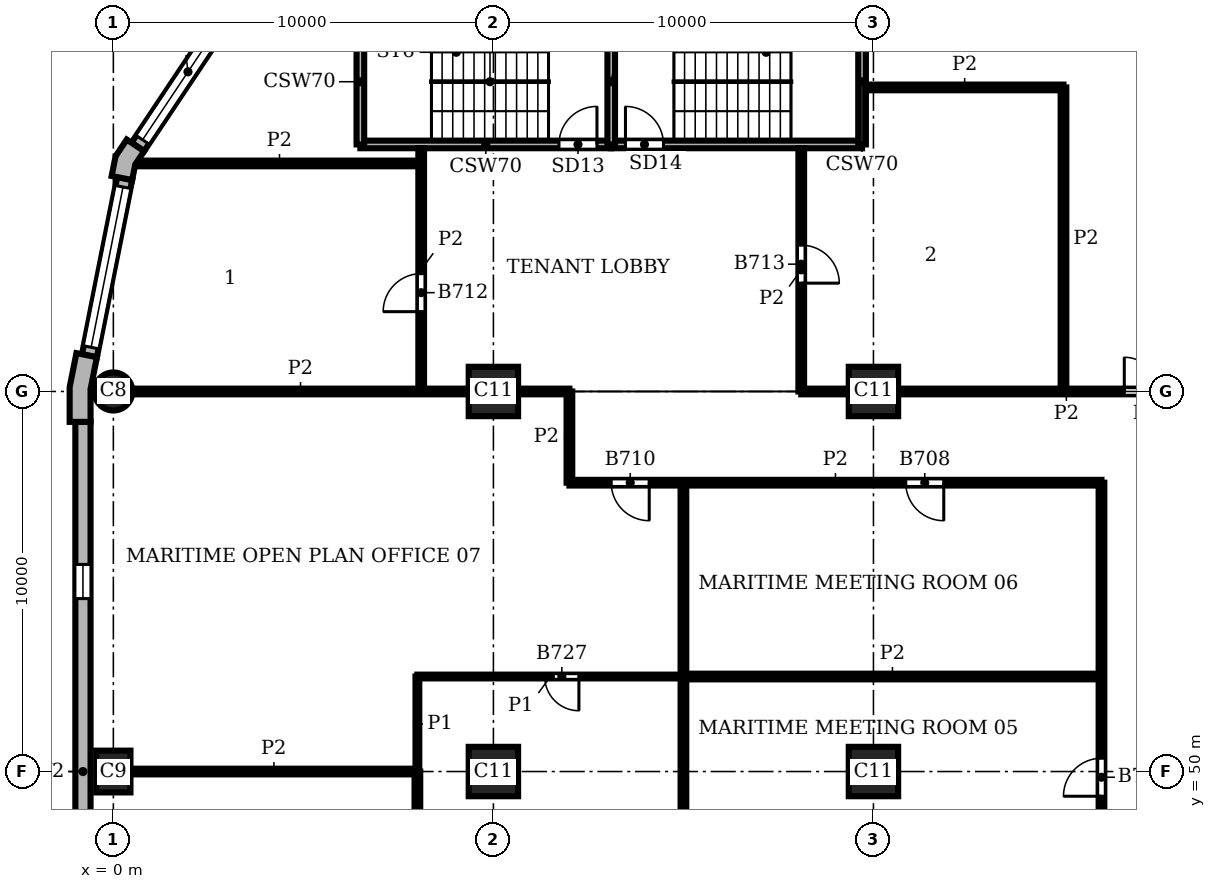
"""IFC4 building model, lengths in metres.
Left out: names, types, materials, properties, quantities, classifications, styles, units other than length and angle.
Written with IfcOpenShell. Run it as: python <this file> out.ifc"""

import sys

from ifc_helpers import new_model, si_unit, direction, frame, frame_2d, origin, origin_2d, place, context, subcontext, project, spatial, polyline, rectangle, circle, outline, extrude, element, fill, save


model = new_model("IFC4")
c1 = context("Model", 3, precision=1e-05, world=origin(), true_north=direction((0.0, 1.0)))
c2 = subcontext(c1, "Body", "Model", "MODEL_VIEW")
j1 = project(units=[si_unit("LENGTHUNIT", "METRE"), si_unit("PLANEANGLEUNIT", "RADIAN")], contexts=[c1])
p1 = place(None, origin())
s1 = spatial("IfcSite", under=j1, at=p1, CompositionType="ELEMENT")
p2 = place(p1, origin())
s2 = spatial("IfcBuilding", under=s1, at=p2, CompositionType="ELEMENT")
p3 = place(p2, frame((0.0, 0.0, 205.8)))
s3 = spatial("IfcBuildingStorey", under=s2, at=p3, CompositionType="ELEMENT", Elevation=205.8)
p4 = place(p3, frame((0.0, 60.0, 0.0), z_axis=(0.0, 0.0, 1.0), x_axis=(1.0, 0.0, 0.0)))
e1 = element("IfcColumn", 1, at=p4, inside=s3, PredefinedType="COLUMN", context=c2, shape_type="SweptSolid", body=[
    extrude(circle(Radius=0.5, at=origin_2d()), origin(), (0.0, 0.0, 1.0), 3.9),
])
p5 = place(p3, frame((0.0, 50.0, 0.0), z_axis=(0.0, 0.0, 1.0), x_axis=(0.0, 1.0, 0.0)))
e2 = element("IfcColumn", 2, at=p5, inside=s3, PredefinedType="COLUMN", context=c2, shape_type="SweptSolid", body=[
    extrude(rectangle(XDim=1.1, YDim=0.9, at=origin_2d()), origin(), (0.0, 0.0, 1.0), 3.9),
])
for number, where, z_axis, x_axis in (
    (3, (10.0, 50.0, 0.0), (0.0, 0.0, 1.0), (1.0, 0.0, 0.0)),
    (4, (10.0, 60.0, 0.0), (0.0, 0.0, 1.0), (1.0, 0.0, 0.0)),
    (5, (20.0, 50.0, 0.0), (0.0, 0.0, 1.0), (1.0, 0.0, 0.0)),
    (6, (20.0, 60.0, 0.0), (0.0, 0.0, 1.0), (1.0, 0.0, 0.0)),
):
    element("IfcColumn", number, at=place(p3, frame(where, z_axis=z_axis, x_axis=x_axis)), inside=s3, PredefinedType="COLUMN", context=c2, shape_type="SweptSolid", body=[
        extrude(rectangle(XDim=1.3, YDim=1.3, at=origin_2d()), origin(), (0.0, 0.0, 1.0), 3.9),
    ])
p6 = place(p3, origin())
e7 = element("IfcWall", 7, at=p6, inside=s3, PredefinedType="SOLIDWALL", context=c2, shape_type="SweptSolid", body=[
    extrude(outline(polyline([(0.477, 66.545), (0.352, 66.629), (0.059, 66.189), (-0.045, 65.67), (0.103, 65.641), (0.495, 65.563), (0.577, 65.974), (0.81, 66.323), (0.477, 66.545)])), origin(), (0.0, 0.0, 1.0), 3.9),
])
e8 = element("IfcWall", 8, at=p6, inside=s3, PredefinedType="SOLIDWALL", context=c2, shape_type="SweptSolid", body=[
    extrude(outline(polyline([(-0.825, 60.98), (-0.972, 61.009), (-1.15, 60.113), (-1.15, 59.2), (-1.0, 59.2), (-0.6, 59.2), (-0.6, 60.059), (-0.432, 60.902), (-0.825, 60.98)])), origin(), (0.0, 0.0, 1.0), 3.9),
])
p7 = place(p3, frame((29.357, 66.434, 0.0), z_axis=(0.0, 0.0, 1.0), x_axis=(-0.555541552266, 0.831488775454, 0.0)))
e9 = element("IfcWall", 9, at=p7, inside=s3, PredefinedType="SOLIDWALL", context=c2, shape_type="SweptSolid", body=[
    extrude(rectangle(XDim=4.753, YDim=0.4, at=frame_2d((2.376, 0.0))), origin(), (0.0, 0.0, 1.0), 3.9),
])
p8 = place(p7, frame((0.226, 0.0, 0.9)))
e10 = element("IfcOpeningElement", 10, at=p8, cuts=e9, PredefinedType="OPENING", context=c2, shape_type="SweptSolid", body=[
    extrude(rectangle(XDim=4.3, YDim=2.35, at=frame_2d((2.15, 1.175))), frame((0.0, 0.21, 0.0), z_axis=(0.0, -1.0, 0.0), x_axis=(1.0, 0.0, 0.0)), (0.0, 0.0, 1.0), 0.42),
])
p9 = place(p3, frame((3.284, 70.386, 0.0), z_axis=(0.0, 0.0, 1.0), x_axis=(-0.555541552266, -0.831488775454, 0.0)))
e11 = element("IfcWall", 11, at=p9, inside=s3, PredefinedType="SOLIDWALL", context=c2, shape_type="SweptSolid", body=[
    extrude(rectangle(XDim=4.753, YDim=0.4, at=frame_2d((2.376, 0.0))), origin(), (0.0, 0.0, 1.0), 3.9),
])
p10 = place(p9, frame((0.226, 0.0, 0.9)))
e12 = element("IfcOpeningElement", 12, at=p10, cuts=e11, PredefinedType="OPENING", context=c2, shape_type="SweptSolid", body=[
    extrude(rectangle(XDim=4.3, YDim=2.35, at=frame_2d((2.15, 1.175))), frame((0.0, 0.21, 0.0), z_axis=(0.0, -1.0, 0.0), x_axis=(1.0, 0.0, 0.0)), (0.0, 0.0, 1.0), 0.42),
])
p11 = place(p3, frame((0.299, 65.602, 0.0), z_axis=(0.0, 0.0, 1.0), x_axis=(-0.195098533057, -0.98078364709, 0.0)))
e13 = element("IfcWall", 13, at=p11, inside=s3, PredefinedType="SOLIDWALL", context=c2, shape_type="SweptSolid", body=[
    extrude(rectangle(XDim=4.753, YDim=0.4, at=frame_2d((2.376, 0.0))), origin(), (0.0, 0.0, 1.0), 3.9),
])
p12 = place(p11, frame((0.226, 0.0, 0.9)))
e14 = element("IfcOpeningElement", 14, at=p12, cuts=e13, PredefinedType="OPENING", context=c2, shape_type="SweptSolid", body=[
    extrude(rectangle(XDim=4.3, YDim=2.35, at=frame_2d((2.15, 1.175))), frame((0.0, 0.21, 0.0), z_axis=(0.0, -1.0, 0.0), x_axis=(1.0, 0.0, 0.0)), (0.0, 0.0, 1.0), 0.42),
])
p13 = place(p3, frame((-0.8, 59.2, 0.0), z_axis=(0.0, 0.0, 1.0), x_axis=(0.0, -1.0, 0.0)))
e15 = element("IfcWall", 15, at=p13, inside=s3, PredefinedType="SOLIDWALL", context=c2, shape_type="SweptSolid", body=[
    extrude(rectangle(XDim=18.4, YDim=0.4, at=frame_2d((9.2, 0.0))), origin(), (0.0, 0.0, 1.0), 3.9),
])
p14 = place(p13, frame((3.75, 0.0, 0.9)))
e16 = element("IfcOpeningElement", 16, at=p14, cuts=e15, PredefinedType="OPENING", context=c2, shape_type="SweptSolid", body=[
    extrude(rectangle(XDim=0.9, YDim=2.35, at=frame_2d((0.45, 1.175))), frame((0.0, 0.21, 0.0), z_axis=(0.0, -1.0, 0.0), x_axis=(1.0, 0.0, 0.0)), (0.0, 0.0, 1.0), 0.42),
])
p15 = place(p13, frame((13.75, 0.0, 0.9)))
e17 = element("IfcOpeningElement", 17, at=p15, cuts=e15, PredefinedType="OPENING", context=c2, shape_type="SweptSolid", body=[
    extrude(rectangle(XDim=0.9, YDim=2.35, at=frame_2d((0.45, 1.175))), frame((0.0, 0.21, 0.0), z_axis=(0.0, -1.0, 0.0), x_axis=(1.0, 0.0, 0.0)), (0.0, 0.0, 1.0), 0.42),
])
p16 = place(p3, frame((6.5, 66.5, 0.0), z_axis=(0.0, 0.0, 1.0), x_axis=(1.0, 0.0, 0.0)))
e18 = element("IfcWall", 18, at=p16, inside=s3, PredefinedType="SHEAR", context=c2, shape_type="SweptSolid", body=[
    extrude(rectangle(XDim=6.6, YDim=0.2, at=frame_2d((3.3, 0.0))), origin(), (0.0, 0.0, 1.0), 3.58),
])
p17 = place(p16, frame((5.225, 0.0, 0.0)))
e19 = element("IfcOpeningElement", 19, at=p17, cuts=e18, PredefinedType="OPENING", context=c2, shape_type="SweptSolid", body=[
    extrude(rectangle(XDim=1.0, YDim=2.1, at=frame_2d((0.5, 1.05))), frame((0.0, 0.11, 0.0), z_axis=(0.0, -1.0, 0.0), x_axis=(1.0, 0.0, 0.0)), (0.0, 0.0, 1.0), 0.22),
])
p18 = place(p3, frame((13.1, 66.5, 0.0), z_axis=(0.0, 0.0, 1.0), x_axis=(1.0, 0.0, 0.0)))
e20 = element("IfcWall", 20, at=p18, inside=s3, PredefinedType="SHEAR", context=c2, shape_type="SweptSolid", body=[
    extrude(rectangle(XDim=6.6, YDim=0.2, at=frame_2d((3.3, 0.0))), origin(), (0.0, 0.0, 1.0), 3.58),
])
p19 = place(p18, frame((0.375, 0.0, 0.0)))
e21 = element("IfcOpeningElement", 21, at=p19, cuts=e20, PredefinedType="OPENING", context=c2, shape_type="SweptSolid", body=[
    extrude(rectangle(XDim=1.0, YDim=2.1, at=frame_2d((0.5, 1.05))), frame((0.0, 0.11, 0.0), z_axis=(0.0, -1.0, 0.0), x_axis=(1.0, 0.0, 0.0)), (0.0, 0.0, 1.0), 0.22),
])
for number, where, z_axis, x_axis in (
    (22, (6.5, 66.5, 0.0), (0.0, 0.0, 1.0), (0.0, 1.0, 0.0)),
    (23, (13.1, 66.5, 0.0), (0.0, 0.0, 1.0), (0.0, 1.0, 0.0)),
    (24, (19.7, 66.5, 0.0), (0.0, 0.0, 1.0), (0.0, 1.0, 0.0)),
):
    element("IfcWall", number, at=place(p3, frame(where, z_axis=z_axis, x_axis=x_axis)), inside=s3, PredefinedType="SHEAR", context=c2, shape_type="SweptSolid", body=[
        extrude(rectangle(XDim=3.3, YDim=0.2, at=frame_2d((1.65, 0.0))), origin(), (0.0, 0.0, 1.0), 3.58),
    ])
p20 = place(p3, frame((8.0, 50.0, 0.0), z_axis=(0.0, 0.0, 1.0), x_axis=(0.0, 1.0, 0.0)))
e25 = element("IfcWall", 25, at=p20, inside=s3, PredefinedType="PARTITIONING", context=c2, shape_type="SweptSolid", body=[
    extrude(rectangle(XDim=2.5, YDim=0.1, at=frame_2d((1.25, 0.0))), origin(), (0.0, 0.0, 1.0), 3.58),
])
p21 = place(p3, frame((8.0, 52.5, 0.0), z_axis=(0.0, 0.0, 1.0), x_axis=(1.0, 0.0, 0.0)))
e26 = element("IfcWall", 26, at=p21, inside=s3, PredefinedType="PARTITIONING", context=c2, shape_type="SweptSolid", body=[
    extrude(rectangle(XDim=7.0, YDim=0.1, at=frame_2d((3.5, 0.0))), origin(), (0.0, 0.0, 1.0), 3.58),
])
p22 = place(p21, frame((3.35, 0.0, 0.0)))
e27 = element("IfcOpeningElement", 27, at=p22, cuts=e26, PredefinedType="OPENING", context=c2, shape_type="SweptSolid", body=[
    extrude(rectangle(XDim=0.9, YDim=2.1, at=frame_2d((0.45, 1.05))), frame((0.0, 0.06, 0.0), z_axis=(0.0, -1.0, 0.0), x_axis=(1.0, 0.0, 0.0)), (0.0, 0.0, 1.0), 0.12),
])
p23 = place(p3, frame((8.0, 40.0, 0.0), z_axis=(0.0, 0.0, 1.0), x_axis=(0.0, 1.0, 0.0)))
e28 = element("IfcWall", 28, at=p23, inside=s3, PredefinedType="PARTITIONING", context=c2, shape_type="SweptSolid", body=[
    extrude(rectangle(XDim=10.0, YDim=0.15, at=frame_2d((5.0, 0.0))), origin(), (0.0, 0.0, 1.0), 3.58),
])
p24 = place(p3, frame((8.1, 60.0, 0.0), z_axis=(0.0, 0.0, 1.0), x_axis=(0.0, 1.0, 0.0)))
e29 = element("IfcWall", 29, at=p24, inside=s3, PredefinedType="PARTITIONING", context=c2, shape_type="SweptSolid", body=[
    extrude(rectangle(XDim=6.4, YDim=0.15, at=frame_2d((3.2, 0.0))), origin(), (0.0, 0.0, 1.0), 3.58),
])
p25 = place(p24, frame((2.1, 0.0, 0.0)))
e30 = element("IfcOpeningElement", 30, at=p25, cuts=e29, PredefinedType="OPENING", context=c2, shape_type="SweptSolid", body=[
    extrude(rectangle(XDim=1.0, YDim=2.1, at=frame_2d((0.5, 1.05))), frame((0.0, 0.085, 0.0), z_axis=(0.0, -1.0, 0.0), x_axis=(1.0, 0.0, 0.0)), (0.0, 0.0, 1.0), 0.17),
])
p26 = place(p3, frame((12.0, 57.6, 0.0), z_axis=(0.0, 0.0, 1.0), x_axis=(0.0, 1.0, 0.0)))
e31 = element("IfcWall", 31, at=p26, inside=s3, PredefinedType="PARTITIONING", context=c2, shape_type="SweptSolid", body=[
    extrude(rectangle(XDim=2.4, YDim=0.15, at=frame_2d((1.2, 0.0))), origin(), (0.0, 0.0, 1.0), 3.58),
])
p27 = place(p3, frame((15.0, 28.0, 0.0), z_axis=(0.0, 0.0, 1.0), x_axis=(0.0, 1.0, 0.0)))
e32 = element("IfcWall", 32, at=p27, inside=s3, PredefinedType="PARTITIONING", context=c2, shape_type="SweptSolid", body=[
    extrude(rectangle(XDim=29.6, YDim=0.15, at=frame_2d((14.8, 0.0))), origin(), (0.0, 0.0, 1.0), 3.58),
])
p28 = place(p3, frame((18.1, 60.0, 0.0), z_axis=(0.0, 0.0, 1.0), x_axis=(0.0, 1.0, 0.0)))
e33 = element("IfcWall", 33, at=p28, inside=s3, PredefinedType="PARTITIONING", context=c2, shape_type="SweptSolid", body=[
    extrude(rectangle(XDim=6.4, YDim=0.15, at=frame_2d((3.2, 0.0))), origin(), (0.0, 0.0, 1.0), 3.58),
])
p29 = place(p28, frame((2.85, 0.0, 0.0)))
e34 = element("IfcOpeningElement", 34, at=p29, cuts=e33, PredefinedType="OPENING", context=c2, shape_type="SweptSolid", body=[
    extrude(rectangle(XDim=1.0, YDim=2.1, at=frame_2d((0.5, 1.05))), frame((0.0, 0.085, 0.0), z_axis=(0.0, -1.0, 0.0), x_axis=(1.0, 0.0, 0.0)), (0.0, 0.0, 1.0), 0.17),
])
p30 = place(p3, frame((25.0, 60.0, 0.0), z_axis=(0.0, 0.0, 1.0), x_axis=(0.0, 1.0, 0.0)))
e35 = element("IfcWall", 35, at=p30, inside=s3, PredefinedType="PARTITIONING", context=c2, shape_type="SweptSolid", body=[
    extrude(rectangle(XDim=8.0, YDim=0.15, at=frame_2d((4.0, 0.0))), origin(), (0.0, 0.0, 1.0), 3.58),
])
p31 = place(p3, frame((26.0, 28.0, 0.0), z_axis=(0.0, 0.0, 1.0), x_axis=(0.0, 1.0, 0.0)))
e36 = element("IfcWall", 36, at=p31, inside=s3, PredefinedType="PARTITIONING", context=c2, shape_type="SweptSolid", body=[
    extrude(rectangle(XDim=29.6, YDim=0.15, at=frame_2d((14.8, 0.0))), origin(), (0.0, 0.0, 1.0), 3.58),
])
p32 = place(p31, frame((3.6, 0.0, 0.0)))
e37 = element("IfcOpeningElement", 37, at=p32, cuts=e36, PredefinedType="OPENING", context=c2, shape_type="SweptSolid", body=[
    extrude(rectangle(XDim=1.0, YDim=2.1, at=frame_2d((0.5, 1.05))), frame((0.0, 0.085, 0.0), z_axis=(0.0, -1.0, 0.0), x_axis=(1.0, 0.0, 0.0)), (0.0, 0.0, 1.0), 0.17),
])
p33 = place(p31, frame((11.85, 0.0, 0.0)))
e38 = element("IfcOpeningElement", 38, at=p33, cuts=e36, PredefinedType="OPENING", context=c2, shape_type="SweptSolid", body=[
    extrude(rectangle(XDim=1.0, YDim=2.1, at=frame_2d((0.5, 1.05))), frame((0.0, 0.085, 0.0), z_axis=(0.0, -1.0, 0.0), x_axis=(1.0, 0.0, 0.0)), (0.0, 0.0, 1.0), 0.17),
])
p34 = place(p31, frame((21.35, 0.0, 0.0)))
e39 = element("IfcOpeningElement", 39, at=p34, cuts=e36, PredefinedType="OPENING", context=c2, shape_type="SweptSolid", body=[
    extrude(rectangle(XDim=1.0, YDim=2.1, at=frame_2d((0.5, 1.05))), frame((0.0, 0.085, 0.0), z_axis=(0.0, -1.0, 0.0), x_axis=(1.0, 0.0, 0.0)), (0.0, 0.0, 1.0), 0.17),
])
p35 = place(p3, frame((0.45, 50.0, 0.0), z_axis=(0.0, 0.0, 1.0), x_axis=(1.0, 0.0, 0.0)))
e40 = element("IfcWall", 40, at=p35, inside=s3, PredefinedType="PARTITIONING", context=c2, shape_type="SweptSolid", body=[
    extrude(rectangle(XDim=7.55, YDim=0.15, at=frame_2d((3.775, 0.0))), origin(), (0.0, 0.0, 1.0), 3.58),
])
p36 = place(p3, frame((15.0, 52.5, 0.0), z_axis=(0.0, 0.0, 1.0), x_axis=(1.0, 0.0, 0.0)))
e41 = element("IfcWall", 41, at=p36, inside=s3, PredefinedType="PARTITIONING", context=c2, shape_type="SweptSolid", body=[
    extrude(rectangle(XDim=11.0, YDim=0.15, at=frame_2d((5.5, 0.0))), origin(), (0.0, 0.0, 1.0), 3.58),
])
p37 = place(p3, frame((12.0, 57.6, 0.0), z_axis=(0.0, 0.0, 1.0), x_axis=(1.0, 0.0, 0.0)))
e42 = element("IfcWall", 42, at=p37, inside=s3, PredefinedType="PARTITIONING", context=c2, shape_type="SweptSolid", body=[
    extrude(rectangle(XDim=14.0, YDim=0.15, at=frame_2d((7.0, 0.0))), origin(), (0.0, 0.0, 1.0), 3.58),
])
p38 = place(p37, frame((8.85, 0.0, 0.0)))
e43 = element("IfcOpeningElement", 43, at=p38, cuts=e42, PredefinedType="OPENING", context=c2, shape_type="SweptSolid", body=[
    extrude(rectangle(XDim=1.0, YDim=2.1, at=frame_2d((0.5, 1.05))), frame((0.0, 0.085, 0.0), z_axis=(0.0, -1.0, 0.0), x_axis=(1.0, 0.0, 0.0)), (0.0, 0.0, 1.0), 0.17),
])
p39 = place(p37, frame((1.1, 0.0, 0.0)))
e44 = element("IfcOpeningElement", 44, at=p39, cuts=e42, PredefinedType="OPENING", context=c2, shape_type="SweptSolid", body=[
    extrude(rectangle(XDim=1.0, YDim=2.1, at=frame_2d((0.5, 1.05))), frame((0.0, 0.085, 0.0), z_axis=(0.0, -1.0, 0.0), x_axis=(1.0, 0.0, 0.0)), (0.0, 0.0, 1.0), 0.17),
])
p40 = place(p3, frame((0.5, 60.0, 0.0), z_axis=(0.0, 0.0, 1.0), x_axis=(1.0, 0.0, 0.0)))
e45 = element("IfcWall", 45, at=p40, inside=s3, PredefinedType="PARTITIONING", context=c2, shape_type="SweptSolid", body=[
    extrude(rectangle(XDim=8.85, YDim=0.15, at=frame_2d((4.425, 0.0))), origin(), (0.0, 0.0, 1.0), 3.58),
])
p41 = place(p3, frame((10.65, 60.0, 0.0), z_axis=(0.0, 0.0, 1.0), x_axis=(1.0, 0.0, 0.0)))
e46 = element("IfcWall", 46, at=p41, inside=s3, PredefinedType="PARTITIONING", context=c2, shape_type="SweptSolid", body=[
    extrude(rectangle(XDim=1.35, YDim=0.15, at=frame_2d((0.675, 0.0))), origin(), (0.0, 0.0, 1.0), 3.58),
])
p42 = place(p3, frame((18.1, 60.0, 0.0), z_axis=(0.0, 0.0, 1.0), x_axis=(1.0, 0.0, 0.0)))
e47 = element("IfcWall", 47, at=p42, inside=s3, PredefinedType="PARTITIONING", context=c2, shape_type="SweptSolid", body=[
    extrude(rectangle(XDim=1.25, YDim=0.15, at=frame_2d((0.625, 0.0))), origin(), (0.0, 0.0, 1.0), 3.58),
])
p43 = place(p3, frame((20.65, 60.0, 0.0), z_axis=(0.0, 0.0, 1.0), x_axis=(1.0, 0.0, 0.0)))
e48 = element("IfcWall", 48, at=p43, inside=s3, PredefinedType="PARTITIONING", context=c2, shape_type="SweptSolid", body=[
    extrude(rectangle(XDim=8.85, YDim=0.15, at=frame_2d((4.425, 0.0))), origin(), (0.0, 0.0, 1.0), 3.58),
])
p44 = place(p43, frame((5.95, 0.0, 0.0)))
e49 = element("IfcOpeningElement", 49, at=p44, cuts=e48, PredefinedType="OPENING", context=c2, shape_type="SweptSolid", body=[
    extrude(rectangle(XDim=1.8, YDim=2.1, at=frame_2d((0.9, 1.05))), frame((0.0, 0.085, 0.0), z_axis=(0.0, -1.0, 0.0), x_axis=(1.0, 0.0, 0.0)), (0.0, 0.0, 1.0), 0.17),
])
p45 = place(p3, frame((0.644, 66.0, 0.0), z_axis=(0.0, 0.0, 1.0), x_axis=(1.0, 0.0, 0.0)))
e50 = element("IfcWall", 50, at=p45, inside=s3, PredefinedType="PARTITIONING", context=c2, shape_type="SweptSolid", body=[
    extrude(rectangle(XDim=7.456, YDim=0.15, at=frame_2d((3.728, 0.0))), origin(), (0.0, 0.0, 1.0), 3.58),
])
p46 = place(p3, frame((19.8, 68.0, 0.0), z_axis=(0.0, 0.0, 1.0), x_axis=(1.0, 0.0, 0.0)))
e51 = element("IfcWall", 51, at=p46, inside=s3, PredefinedType="PARTITIONING", context=c2, shape_type="SweptSolid", body=[
    extrude(rectangle(XDim=5.2, YDim=0.15, at=frame_2d((2.6, 0.0))), origin(), (0.0, 0.0, 1.0), 3.58),
])
p47 = place(p8, origin())
e52 = element("IfcWindow", 52, at=p47, inside=s3, PartitioningType="SINGLE_PANEL", PredefinedType="WINDOW", context=c2, shape_type="SweptSolid", body=[
    extrude(rectangle(XDim=4.3, YDim=2.35, at=frame_2d((2.15, 1.175))), frame((0.0, 0.16, 0.0), z_axis=(0.0, -1.0, 0.0), x_axis=(1.0, 0.0, 0.0)), (0.0, 0.0, 1.0), 0.06),
])
fill(e10, e52)
p48 = place(p10, origin())
e53 = element("IfcWindow", 53, at=p48, inside=s3, PartitioningType="SINGLE_PANEL", PredefinedType="WINDOW", context=c2, shape_type="SweptSolid", body=[
    extrude(rectangle(XDim=4.3, YDim=2.35, at=frame_2d((2.15, 1.175))), frame((0.0, 0.16, 0.0), z_axis=(0.0, -1.0, 0.0), x_axis=(1.0, 0.0, 0.0)), (0.0, 0.0, 1.0), 0.06),
])
fill(e12, e53)
p49 = place(p12, origin())
e54 = element("IfcWindow", 54, at=p49, inside=s3, PartitioningType="SINGLE_PANEL", PredefinedType="WINDOW", context=c2, shape_type="SweptSolid", body=[
    extrude(rectangle(XDim=4.3, YDim=2.35, at=frame_2d((2.15, 1.175))), frame((0.0, 0.16, 0.0), z_axis=(0.0, -1.0, 0.0), x_axis=(1.0, 0.0, 0.0)), (0.0, 0.0, 1.0), 0.06),
])
fill(e14, e54)
p50 = place(p14, origin())
e55 = element("IfcWindow", 55, at=p50, inside=s3, PartitioningType="SINGLE_PANEL", PredefinedType="WINDOW", context=c2, shape_type="SweptSolid", body=[
    extrude(rectangle(XDim=0.9, YDim=2.35, at=frame_2d((0.45, 1.175))), frame((0.0, 0.16, 0.0), z_axis=(0.0, -1.0, 0.0), x_axis=(1.0, 0.0, 0.0)), (0.0, 0.0, 1.0), 0.06),
])
fill(e16, e55)
p51 = place(p17, origin())
e56 = element("IfcDoor", 56, at=p51, inside=s3, OperationType="SINGLE_SWING_RIGHT", PredefinedType="DOOR", context=c2, shape_type="SweptSolid", body=[
    extrude(rectangle(XDim=1.0, YDim=2.1, at=frame_2d((0.5, 1.05))), frame((0.0, 0.025, 0.0), z_axis=(0.0, -1.0, 0.0), x_axis=(1.0, 0.0, 0.0)), (0.0, 0.0, 1.0), 0.05),
])
fill(e19, e56)
p52 = place(p19, origin())
e57 = element("IfcDoor", 57, at=p52, inside=s3, OperationType="SINGLE_SWING_LEFT", PredefinedType="DOOR", context=c2, shape_type="SweptSolid", body=[
    extrude(rectangle(XDim=1.0, YDim=2.1, at=frame_2d((0.5, 1.05))), frame((0.0, 0.025, 0.0), z_axis=(0.0, -1.0, 0.0), x_axis=(1.0, 0.0, 0.0)), (0.0, 0.0, 1.0), 0.05),
])
fill(e21, e57)
p53 = place(p34, origin())
e58 = element("IfcDoor", 58, at=p53, inside=s3, OperationType="SINGLE_SWING_LEFT", PredefinedType="DOOR", context=c2, shape_type="SweptSolid", body=[
    extrude(rectangle(XDim=1.0, YDim=2.1, at=frame_2d((0.5, 1.05))), frame((0.0, 0.025, 0.0), z_axis=(0.0, -1.0, 0.0), x_axis=(1.0, 0.0, 0.0)), (0.0, 0.0, 1.0), 0.05),
])
fill(e39, e58)
p54 = place(p38, frame((1.0, 0.0, 0.0), z_axis=(0.0, 0.0, 1.0), x_axis=(-1.0, 0.0, 0.0)))
e59 = element("IfcDoor", 59, at=p54, inside=s3, OperationType="SINGLE_SWING_LEFT", PredefinedType="DOOR", context=c2, shape_type="SweptSolid", body=[
    extrude(rectangle(XDim=1.0, YDim=2.1, at=frame_2d((0.5, 1.05))), frame((0.0, 0.025, 0.0), z_axis=(0.0, -1.0, 0.0), x_axis=(1.0, 0.0, 0.0)), (0.0, 0.0, 1.0), 0.05),
])
fill(e43, e59)
p55 = place(p39, frame((1.0, 0.0, 0.0), z_axis=(0.0, 0.0, 1.0), x_axis=(-1.0, 0.0, 0.0)))
e60 = element("IfcDoor", 60, at=p55, inside=s3, OperationType="SINGLE_SWING_LEFT", PredefinedType="DOOR", context=c2, shape_type="SweptSolid", body=[
    extrude(rectangle(XDim=1.0, YDim=2.1, at=frame_2d((0.5, 1.05))), frame((0.0, 0.025, 0.0), z_axis=(0.0, -1.0, 0.0), x_axis=(1.0, 0.0, 0.0)), (0.0, 0.0, 1.0), 0.05),
])
fill(e44, e60)
p56 = place(p25, origin())
e61 = element("IfcDoor", 61, at=p56, inside=s3, OperationType="SINGLE_SWING_LEFT", PredefinedType="DOOR", context=c2, shape_type="SweptSolid", body=[
    extrude(rectangle(XDim=1.0, YDim=2.1, at=frame_2d((0.5, 1.05))), frame((0.0, 0.025, 0.0), z_axis=(0.0, -1.0, 0.0), x_axis=(1.0, 0.0, 0.0)), (0.0, 0.0, 1.0), 0.05),
])
fill(e30, e61)
p57 = place(p29, frame((1.0, 0.0, 0.0), z_axis=(0.0, 0.0, 1.0), x_axis=(-1.0, 0.0, 0.0)))
e62 = element("IfcDoor", 62, at=p57, inside=s3, OperationType="SINGLE_SWING_RIGHT", PredefinedType="DOOR", context=c2, shape_type="SweptSolid", body=[
    extrude(rectangle(XDim=1.0, YDim=2.1, at=frame_2d((0.5, 1.05))), frame((0.0, 0.025, 0.0), z_axis=(0.0, -1.0, 0.0), x_axis=(1.0, 0.0, 0.0)), (0.0, 0.0, 1.0), 0.05),
])
fill(e34, e62)
p58 = place(p44, origin())
e63 = element("IfcDoor", 63, at=p58, inside=s3, OperationType="DOUBLE_DOOR_SINGLE_SWING", PredefinedType="DOOR", context=c2, shape_type="SweptSolid", body=[
    extrude(rectangle(XDim=1.8, YDim=2.1, at=frame_2d((0.9, 1.05))), frame((0.0, 0.025, 0.0), z_axis=(0.0, -1.0, 0.0), x_axis=(1.0, 0.0, 0.0)), (0.0, 0.0, 1.0), 0.05),
])
fill(e49, e63)
p59 = place(p22, frame((0.9, 0.0, 0.0), z_axis=(0.0, 0.0, 1.0), x_axis=(-1.0, 0.0, 0.0)))
e64 = element("IfcDoor", 64, at=p59, inside=s3, OperationType="SINGLE_SWING_LEFT", PredefinedType="DOOR", context=c2, shape_type="SweptSolid", body=[
    extrude(rectangle(XDim=0.9, YDim=2.1, at=frame_2d((0.45, 1.05))), frame((0.0, 0.025, 0.0), z_axis=(0.0, -1.0, 0.0), x_axis=(1.0, 0.0, 0.0)), (0.0, 0.0, 1.0), 0.05),
])
fill(e27, e64)
save(model, sys.argv[1])
